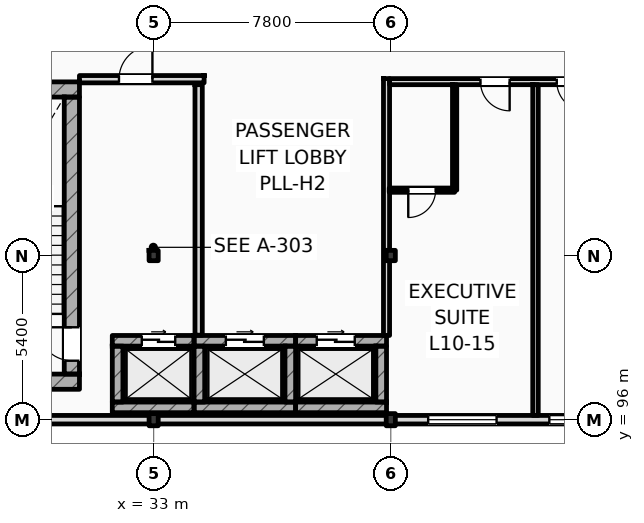
"""IFC4 building model, lengths in metres.
Left out: names, types, materials, properties, quantities, classifications, styles, units other than length and angle.
Written with IfcOpenShell. Run it as: python <this file> out.ifc"""

import sys

from ifc_helpers import new_model, si_unit, direction, frame, frame_2d, origin, origin_2d, place, context, subcontext, project, spatial, rectangle, i_section, extrude, element, fill, save


model = new_model("IFC4")
c1 = context("Model", 3, precision=1e-05, world=origin(), true_north=direction((0.0, 1.0)))
c2 = subcontext(c1, "Body", "Model", "MODEL_VIEW")
j1 = project(units=[si_unit("LENGTHUNIT", "METRE"), si_unit("PLANEANGLEUNIT", "RADIAN")], contexts=[c1])
p1 = place(None, origin())
s1 = spatial("IfcSite", under=j1, at=p1, CompositionType="ELEMENT")
p2 = place(p1, origin())
s2 = spatial("IfcBuilding", under=s1, at=p2, CompositionType="ELEMENT")
p3 = place(p2, frame((0.0, 0.0, 42.6)))
s3 = spatial("IfcBuildingStorey", under=s2, at=p3, CompositionType="ELEMENT", Elevation=42.6)
p4 = place(p3, frame((33.0, 96.0, 0.0), z_axis=(0.0, 0.0, 1.0), x_axis=(1.0, 0.0, 0.0)))
e1 = element("IfcColumn", 1, at=p4, inside=s3, PredefinedType="COLUMN", context=c2, shape_type="SweptSolid", body=[
    extrude(i_section(OverallWidth=0.3, OverallDepth=0.4, WebThickness=0.013, FlangeThickness=0.024, FilletRadius=0.027, at=origin_2d()), origin(), (0.0, 0.0, 1.0), 4.2),
])
p5 = place(p3, frame((33.0, 101.4, 0.0), z_axis=(0.0, 0.0, 1.0), x_axis=(1.0, 0.0, 0.0)))
e2 = element("IfcColumn", 2, at=p5, inside=s3, PredefinedType="COLUMN", context=c2, shape_type="SweptSolid", body=[
    extrude(i_section(OverallWidth=0.3, OverallDepth=0.34, WebThickness=0.012, FlangeThickness=0.021, FilletRadius=0.027, at=origin_2d()), origin(), (0.0, 0.0, 1.0), 4.2),
])
p6 = place(p3, frame((40.8, 96.0, 0.0), z_axis=(0.0, 0.0, 1.0), x_axis=(1.0, 0.0, 0.0)))
e3 = element("IfcColumn", 3, at=p6, inside=s3, PredefinedType="COLUMN", context=c2, shape_type="SweptSolid", body=[
    extrude(i_section(OverallWidth=0.3, OverallDepth=0.4, WebThickness=0.013, FlangeThickness=0.024, FilletRadius=0.027, at=origin_2d()), origin(), (0.0, 0.0, 1.0), 4.2),
])
p7 = place(p3, frame((40.8, 101.4, 0.0), z_axis=(0.0, 0.0, 1.0), x_axis=(1.0, 0.0, 0.0)))
e4 = element("IfcColumn", 4, at=p7, inside=s3, PredefinedType="COLUMN", context=c2, shape_type="SweptSolid", body=[
    extrude(i_section(OverallWidth=0.3, OverallDepth=0.34, WebThickness=0.012, FlangeThickness=0.021, FilletRadius=0.027, at=origin_2d()), origin(), (0.0, 0.0, 1.0), 4.2),
])
for number, where, z_axis, x_axis in (
    (5, (25.4, 106.862, 0.0), (0.0, 0.0, 1.0), (1.0, 0.0, 0.0)),
    (6, (25.4, 97.25, 0.0), (0.0, 0.0, 1.0), (1.0, 0.0, 0.0)),
):
    element("IfcWall", number, at=place(p3, frame(where, z_axis=z_axis, x_axis=x_axis)), inside=s3, PredefinedType="SHEAR", context=c2, shape_type="SweptSolid", body=[
        extrude(rectangle(XDim=5.16, YDim=0.5, at=frame_2d((2.58, 0.0))), origin(), (0.0, 0.0, 1.0), 4.2),
    ])
p8 = place(p3, frame((30.31, 97.5, 0.0), z_axis=(0.0, 0.0, 1.0), x_axis=(0.0, 1.0, 0.0)))
e7 = element("IfcWall", 7, at=p8, inside=s3, PredefinedType="SHEAR", context=c2, shape_type="SweptSolid", body=[
    extrude(rectangle(XDim=9.112, YDim=0.5, at=frame_2d((4.556, 0.0))), origin(), (0.0, 0.0, 1.0), 4.2),
])
p9 = place(p8, frame((0.44, 0.0, 0.0)))
e8 = element("IfcOpeningElement", 8, at=p9, cuts=e7, PredefinedType="OPENING", context=c2, shape_type="SweptSolid", body=[
    extrude(rectangle(XDim=1.1, YDim=2.2, at=frame_2d((0.55, 1.1))), frame((0.0, 0.26, 0.0), z_axis=(0.0, -1.0, 0.0), x_axis=(1.0, 0.0, 0.0)), (0.0, 0.0, 1.0), 0.52),
])
p10 = place(p3, frame((25.2, 96.0, 0.0), z_axis=(0.0, 0.0, 1.0), x_axis=(1.0, 0.0, 0.0)))
e9 = element("IfcWall", 9, at=p10, inside=s3, PredefinedType="STANDARD", context=c2, shape_type="SweptSolid", body=[
    extrude(rectangle(XDim=70.2, YDim=0.28, at=frame_2d((35.1, 0.0))), origin(), (0.0, 0.0, 1.0), 3.42),
])
p11 = place(p10, frame((16.83, 0.0, 0.9)))
e10 = element("IfcOpeningElement", 10, at=p11, cuts=e9, PredefinedType="OPENING", context=c2, shape_type="SweptSolid", body=[
    extrude(rectangle(XDim=2.25, YDim=2.15, at=frame_2d((1.125, 1.075))), frame((0.0, 0.15, 0.0), z_axis=(0.0, -1.0, 0.0), x_axis=(1.0, 0.0, 0.0)), (0.0, 0.0, 1.0), 0.3),
])
p12 = place(p10, frame((20.815, 0.0, 0.9)))
e11 = element("IfcOpeningElement", 11, at=p12, cuts=e9, PredefinedType="OPENING", context=c2, shape_type="SweptSolid", body=[
    extrude(rectangle(XDim=1.8, YDim=2.2, at=frame_2d((0.9, 1.1))), frame((0.0, 0.15, 0.0), z_axis=(0.0, -1.0, 0.0), x_axis=(1.0, 0.0, 0.0)), (0.0, 0.0, 1.0), 0.3),
])
p13 = place(p10, frame((26.03, 0.0, 0.9)))
e12 = element("IfcOpeningElement", 12, at=p13, cuts=e9, PredefinedType="OPENING", context=c2, shape_type="SweptSolid", body=[
    extrude(rectangle(XDim=2.55, YDim=2.25, at=frame_2d((1.275, 1.125))), frame((0.0, 0.15, 0.0), z_axis=(0.0, -1.0, 0.0), x_axis=(1.0, 0.0, 0.0)), (0.0, 0.0, 1.0), 0.3),
])
p14 = place(p10, frame((32.045, 0.0, 0.9)))
e13 = element("IfcOpeningElement", 13, at=p14, cuts=e9, PredefinedType="OPENING", context=c2, shape_type="SweptSolid", body=[
    extrude(rectangle(XDim=1.35, YDim=2.3, at=frame_2d((0.675, 1.15))), frame((0.0, 0.15, 0.0), z_axis=(0.0, -1.0, 0.0), x_axis=(1.0, 0.0, 0.0)), (0.0, 0.0, 1.0), 0.3),
])
p15 = place(p10, frame((35.2, 0.0, 0.9)))
e14 = element("IfcOpeningElement", 14, at=p15, cuts=e9, PredefinedType="OPENING", context=c2, shape_type="SweptSolid", body=[
    extrude(rectangle(XDim=2.85, YDim=2.34, at=frame_2d((1.425, 1.17))), frame((0.0, 0.15, 0.0), z_axis=(0.0, -1.0, 0.0), x_axis=(1.0, 0.0, 0.0)), (0.0, 0.0, 1.0), 0.3),
])
p16 = place(p10, frame((55.544, 0.0, 0.9)))
e15 = element("IfcOpeningElement", 15, at=p16, cuts=e9, PredefinedType="OPENING", context=c2, shape_type="SweptSolid", body=[
    extrude(rectangle(XDim=3.0, YDim=2.34, at=frame_2d((1.5, 1.17))), frame((0.0, 0.15, 0.0), z_axis=(0.0, -1.0, 0.0), x_axis=(1.0, 0.0, 0.0)), (0.0, 0.0, 1.0), 0.3),
])
p17 = place(p10, frame((60.151, 0.0, 0.9)))
e16 = element("IfcOpeningElement", 16, at=p17, cuts=e9, PredefinedType="OPENING", context=c2, shape_type="SweptSolid", body=[
    extrude(rectangle(XDim=1.35, YDim=2.34, at=frame_2d((0.675, 1.17))), frame((0.0, 0.15, 0.0), z_axis=(0.0, -1.0, 0.0), x_axis=(1.0, 0.0, 0.0)), (0.0, 0.0, 1.0), 0.3),
])
p18 = place(p10, frame((65.582, 0.0, 0.9)))
e17 = element("IfcOpeningElement", 17, at=p18, cuts=e9, PredefinedType="OPENING", context=c2, shape_type="SweptSolid", body=[
    extrude(rectangle(XDim=3.4, YDim=2.34, at=frame_2d((1.7, 1.17))), frame((0.0, 0.15, 0.0), z_axis=(0.0, -1.0, 0.0), x_axis=(1.0, 0.0, 0.0)), (0.0, 0.0, 1.0), 0.3),
])
p19 = place(p3, frame((31.64, 98.595, 0.0), z_axis=(0.0, 0.0, 1.0), x_axis=(1.0, 0.0, 0.0)))
e18 = element("IfcWall", 18, at=p19, inside=s3, PredefinedType="SHEAR", context=c2, shape_type="SweptSolid", body=[
    extrude(rectangle(XDim=2.69, YDim=0.35, at=frame_2d((1.345, 0.0))), origin(), (0.0, 0.0, 1.0), 3.94),
])
p20 = place(p19, frame((0.97, 0.0, 0.0)))
e19 = element("IfcOpeningElement", 19, at=p20, cuts=e18, PredefinedType="OPENING", context=c2, shape_type="SweptSolid", body=[
    extrude(rectangle(XDim=1.1, YDim=2.2, at=frame_2d((0.55, 1.1))), frame((0.0, 0.185, 0.0), z_axis=(0.0, -1.0, 0.0), x_axis=(1.0, 0.0, 0.0)), (0.0, 0.0, 1.0), 0.37),
])
p21 = place(p3, frame((31.64, 96.405, 0.0), z_axis=(0.0, 0.0, 1.0), x_axis=(1.0, 0.0, 0.0)))
e20 = element("IfcWall", 20, at=p21, inside=s3, PredefinedType="SHEAR", context=c2, shape_type="SweptSolid", body=[
    extrude(rectangle(XDim=2.69, YDim=0.35, at=frame_2d((1.345, 0.0))), origin(), (0.0, 0.0, 1.0), 3.94),
])
p22 = place(p3, frame((31.815, 96.58, 0.0), z_axis=(0.0, 0.0, 1.0), x_axis=(0.0, 1.0, 0.0)))
e21 = element("IfcWall", 21, at=p22, inside=s3, PredefinedType="SHEAR", context=c2, shape_type="SweptSolid", body=[
    extrude(rectangle(XDim=1.84, YDim=0.35, at=frame_2d((0.92, 0.0))), origin(), (0.0, 0.0, 1.0), 3.94),
])
p23 = place(p3, frame((34.33, 98.595, 0.0), z_axis=(0.0, 0.0, 1.0), x_axis=(1.0, 0.0, 0.0)))
e22 = element("IfcWall", 22, at=p23, inside=s3, PredefinedType="SHEAR", context=c2, shape_type="SweptSolid", body=[
    extrude(rectangle(XDim=3.34, YDim=0.35, at=frame_2d((1.67, 0.0))), origin(), (0.0, 0.0, 1.0), 3.94),
])
p24 = place(p23, frame((1.045, 0.0, 0.0)))
e23 = element("IfcOpeningElement", 23, at=p24, cuts=e22, PredefinedType="OPENING", context=c2, shape_type="SweptSolid", body=[
    extrude(rectangle(XDim=1.25, YDim=2.25, at=frame_2d((0.625, 1.125))), frame((0.0, 0.185, 0.0), z_axis=(0.0, -1.0, 0.0), x_axis=(1.0, 0.0, 0.0)), (0.0, 0.0, 1.0), 0.37),
])
p25 = place(p3, frame((34.33, 96.405, 0.0), z_axis=(0.0, 0.0, 1.0), x_axis=(1.0, 0.0, 0.0)))
e24 = element("IfcWall", 24, at=p25, inside=s3, PredefinedType="SHEAR", context=c2, shape_type="SweptSolid", body=[
    extrude(rectangle(XDim=3.34, YDim=0.35, at=frame_2d((1.67, 0.0))), origin(), (0.0, 0.0, 1.0), 3.94),
])
for number, where, z_axis, x_axis in (
    (25, (34.505, 96.58, 0.0), (0.0, 0.0, 1.0), (0.0, 1.0, 0.0)),
    (26, (37.495, 96.58, 0.0), (0.0, 0.0, 1.0), (0.0, 1.0, 0.0)),
):
    element("IfcWall", number, at=place(p3, frame(where, z_axis=z_axis, x_axis=x_axis)), inside=s3, PredefinedType="SHEAR", context=c2, shape_type="SweptSolid", body=[
        extrude(rectangle(XDim=1.84, YDim=0.35, at=frame_2d((0.92, 0.0))), origin(), (0.0, 0.0, 1.0), 3.94),
    ])
p26 = place(p3, frame((37.67, 98.595, 0.0), z_axis=(0.0, 0.0, 1.0), x_axis=(1.0, 0.0, 0.0)))
e27 = element("IfcWall", 27, at=p26, inside=s3, PredefinedType="SHEAR", context=c2, shape_type="SweptSolid", body=[
    extrude(rectangle(XDim=2.99, YDim=0.35, at=frame_2d((1.495, 0.0))), origin(), (0.0, 0.0, 1.0), 3.94),
])
p27 = place(p26, frame((0.695, 0.0, 0.0)))
e28 = element("IfcOpeningElement", 28, at=p27, cuts=e27, PredefinedType="OPENING", context=c2, shape_type="SweptSolid", body=[
    extrude(rectangle(XDim=1.25, YDim=2.25, at=frame_2d((0.625, 1.125))), frame((0.0, 0.185, 0.0), z_axis=(0.0, -1.0, 0.0), x_axis=(1.0, 0.0, 0.0)), (0.0, 0.0, 1.0), 0.37),
])
p28 = place(p3, frame((37.67, 96.405, 0.0), z_axis=(0.0, 0.0, 1.0), x_axis=(1.0, 0.0, 0.0)))
e29 = element("IfcWall", 29, at=p28, inside=s3, PredefinedType="SHEAR", context=c2, shape_type="SweptSolid", body=[
    extrude(rectangle(XDim=2.99, YDim=0.35, at=frame_2d((1.495, 0.0))), origin(), (0.0, 0.0, 1.0), 3.94),
])
p29 = place(p3, frame((40.485, 96.58, 0.0), z_axis=(0.0, 0.0, 1.0), x_axis=(0.0, 1.0, 0.0)))
e30 = element("IfcWall", 30, at=p29, inside=s3, PredefinedType="SHEAR", context=c2, shape_type="SweptSolid", body=[
    extrude(rectangle(XDim=1.84, YDim=0.35, at=frame_2d((0.92, 0.0))), origin(), (0.0, 0.0, 1.0), 3.57),
])
p30 = place(p3, frame((34.48, 98.78, 0.0), z_axis=(0.0, 0.0, 1.0), x_axis=(0.0, 1.0, 0.0)))
e31 = element("IfcWall", 31, at=p30, inside=s3, PredefinedType="STANDARD", context=c2, shape_type="SweptSolid", body=[
    extrude(rectangle(XDim=8.24, YDim=0.24, at=frame_2d((4.12, 0.0))), origin(), (0.0, 0.0, 1.0), 3.94),
])
p31 = place(p3, frame((30.56, 107.2, 0.0), z_axis=(0.0, 0.0, 1.0), x_axis=(1.0, 0.0, 0.0)))
e32 = element("IfcWall", 32, at=p31, inside=s3, PredefinedType="STANDARD", context=c2, shape_type="SweptSolid", body=[
    extrude(rectangle(XDim=4.1, YDim=0.24, at=frame_2d((2.05, 0.0))), origin(), (0.0, 0.0, 1.0), 3.94),
])
p32 = place(p31, frame((1.3, 0.0, 0.0)))
e33 = element("IfcOpeningElement", 33, at=p32, cuts=e32, PredefinedType="OPENING", context=c2, shape_type="SweptSolid", body=[
    extrude(rectangle(XDim=1.1, YDim=2.2, at=frame_2d((0.55, 1.1))), frame((0.0, 0.13, 0.0), z_axis=(0.0, -1.0, 0.0), x_axis=(1.0, 0.0, 0.0)), (0.0, 0.0, 1.0), 0.26),
])
p33 = place(p3, frame((40.76, 107.12, 0.0), z_axis=(0.0, 0.0, 1.0), x_axis=(1.0, 0.0, 0.0)))
e34 = element("IfcWall", 34, at=p33, inside=s3, PredefinedType="PARTITIONING", context=c2, shape_type="SweptSolid", body=[
    extrude(rectangle(XDim=23.44, YDim=0.2, at=frame_2d((11.72, 0.0))), origin(), (0.0, 0.0, 1.0), 3.94),
])
p34 = place(p33, frame((2.99, 0.0, 0.0)))
e35 = element("IfcOpeningElement", 35, at=p34, cuts=e34, PredefinedType="OPENING", context=c2, shape_type="SweptSolid", body=[
    extrude(rectangle(XDim=0.96, YDim=2.2, at=frame_2d((0.48, 1.1))), frame((0.0, 0.11, 0.0), z_axis=(0.0, -1.0, 0.0), x_axis=(1.0, 0.0, 0.0)), (0.0, 0.0, 1.0), 0.22),
])
p35 = place(p33, frame((5.5, 0.0, 0.0)))
e36 = element("IfcOpeningElement", 36, at=p35, cuts=e34, PredefinedType="OPENING", context=c2, shape_type="SweptSolid", body=[
    extrude(rectangle(XDim=0.96, YDim=2.2, at=frame_2d((0.48, 1.1))), frame((0.0, 0.11, 0.0), z_axis=(0.0, -1.0, 0.0), x_axis=(1.0, 0.0, 0.0)), (0.0, 0.0, 1.0), 0.22),
])
p36 = place(p33, frame((12.34, 0.0, 0.0)))
e37 = element("IfcOpeningElement", 37, at=p36, cuts=e34, PredefinedType="OPENING", context=c2, shape_type="SweptSolid", body=[
    extrude(rectangle(XDim=0.96, YDim=2.2, at=frame_2d((0.48, 1.1))), frame((0.0, 0.11, 0.0), z_axis=(0.0, -1.0, 0.0), x_axis=(1.0, 0.0, 0.0)), (0.0, 0.0, 1.0), 0.22),
])
p37 = place(p33, frame((17.03, 0.0, 0.0)))
e38 = element("IfcOpeningElement", 38, at=p37, cuts=e34, PredefinedType="OPENING", context=c2, shape_type="SweptSolid", body=[
    extrude(rectangle(XDim=0.96, YDim=2.2, at=frame_2d((0.48, 1.1))), frame((0.0, 0.11, 0.0), z_axis=(0.0, -1.0, 0.0), x_axis=(1.0, 0.0, 0.0)), (0.0, 0.0, 1.0), 0.22),
])
p38 = place(p33, frame((19.51, 0.0, 0.0)))
e39 = element("IfcOpeningElement", 39, at=p38, cuts=e34, PredefinedType="OPENING", context=c2, shape_type="SweptSolid", body=[
    extrude(rectangle(XDim=0.96, YDim=2.2, at=frame_2d((0.48, 1.1))), frame((0.0, 0.11, 0.0), z_axis=(0.0, -1.0, 0.0), x_axis=(1.0, 0.0, 0.0)), (0.0, 0.0, 1.0), 0.22),
])
p39 = place(p3, frame((40.66, 98.77, 0.0), z_axis=(0.0, 0.0, 1.0), x_axis=(0.0, 1.0, 0.0)))
e40 = element("IfcWall", 40, at=p39, inside=s3, PredefinedType="PARTITIONING", context=c2, shape_type="SweptSolid", body=[
    extrude(rectangle(XDim=8.45, YDim=0.2, at=frame_2d((4.225, 0.0))), origin(), (0.0, 0.0, 1.0), 3.57),
])
p40 = place(p3, frame((45.56, 96.14, 0.0), z_axis=(0.0, 0.0, 1.0), x_axis=(0.0, 1.0, 0.0)))
e41 = element("IfcWall", 41, at=p40, inside=s3, PredefinedType="PARTITIONING", context=c2, shape_type="SweptSolid", body=[
    extrude(rectangle(XDim=10.88, YDim=0.18, at=frame_2d((5.44, 0.0))), origin(), (0.0, 0.0, 1.0), 3.94),
])
p41 = place(p3, frame((42.9, 103.55, 0.0), z_axis=(0.0, 0.0, 1.0), x_axis=(0.0, 1.0, 0.0)))
e42 = element("IfcWall", 42, at=p41, inside=s3, PredefinedType="PARTITIONING", context=c2, shape_type="SweptSolid", body=[
    extrude(rectangle(XDim=3.47, YDim=0.14, at=frame_2d((1.735, 0.0))), origin(), (0.0, 0.0, 1.0), 3.94),
])
p42 = place(p3, frame((40.75, 103.55, 0.0), z_axis=(0.0, 0.0, 1.0), x_axis=(1.0, 0.0, 0.0)))
e43 = element("IfcWall", 43, at=p42, inside=s3, PredefinedType="PARTITIONING", context=c2, shape_type="SweptSolid", body=[
    extrude(rectangle(XDim=2.15, YDim=0.14, at=frame_2d((1.075, 0.0))), origin(), (0.0, 0.0, 1.0), 3.94),
])
p43 = place(p42, frame((0.625, 0.0, 0.0)))
e44 = element("IfcOpeningElement", 44, at=p43, cuts=e43, PredefinedType="OPENING", context=c2, shape_type="SweptSolid", body=[
    extrude(rectangle(XDim=0.9, YDim=2.1, at=frame_2d((0.45, 1.05))), frame((0.0, 0.08, 0.0), z_axis=(0.0, -1.0, 0.0), x_axis=(1.0, 0.0, 0.0)), (0.0, 0.0, 1.0), 0.16),
])
p44 = place(p11, origin())
e45 = element("IfcWindow", 45, at=p44, inside=s3, PartitioningType="DOUBLE_PANEL_VERTICAL", PredefinedType="WINDOW", context=c2, shape_type="SweptSolid", body=[
    extrude(rectangle(XDim=2.25, YDim=2.15, at=frame_2d((1.125, 1.075))), frame((0.0, 0.03, 0.0), z_axis=(0.0, -1.0, 0.0), x_axis=(1.0, 0.0, 0.0)), (0.0, 0.0, 1.0), 0.06),
])
fill(e10, e45)
p45 = place(p12, origin())
e46 = element("IfcWindow", 46, at=p45, inside=s3, PartitioningType="DOUBLE_PANEL_VERTICAL", PredefinedType="WINDOW", context=c2, shape_type="SweptSolid", body=[
    extrude(rectangle(XDim=1.8, YDim=2.2, at=frame_2d((0.9, 1.1))), frame((0.0, 0.03, 0.0), z_axis=(0.0, -1.0, 0.0), x_axis=(1.0, 0.0, 0.0)), (0.0, 0.0, 1.0), 0.06),
])
fill(e11, e46)
p46 = place(p9, origin())
e47 = element("IfcDoor", 47, at=p46, inside=s3, OperationType="SINGLE_SWING_RIGHT", PredefinedType="DOOR", context=c2, shape_type="SweptSolid", body=[
    extrude(rectangle(XDim=1.1, YDim=2.2, at=frame_2d((0.55, 1.1))), frame((0.0, 0.025, 0.0), z_axis=(0.0, -1.0, 0.0), x_axis=(1.0, 0.0, 0.0)), (0.0, 0.0, 1.0), 0.05),
])
fill(e8, e47)
p47 = place(p20, origin())
e48 = element("IfcDoor", 48, at=p47, inside=s3, OperationType="SLIDING_TO_LEFT", PredefinedType="DOOR", context=c2, shape_type="SweptSolid", body=[
    extrude(rectangle(XDim=1.1, YDim=2.2, at=frame_2d((0.55, 1.1))), frame((0.0, 0.025, 0.0), z_axis=(0.0, -1.0, 0.0), x_axis=(1.0, 0.0, 0.0)), (0.0, 0.0, 1.0), 0.05),
])
fill(e19, e48)
p48 = place(p24, origin())
e49 = element("IfcDoor", 49, at=p48, inside=s3, OperationType="SLIDING_TO_LEFT", PredefinedType="DOOR", context=c2, shape_type="SweptSolid", body=[
    extrude(rectangle(XDim=1.25, YDim=2.25, at=frame_2d((0.625, 1.125))), frame((0.0, 0.025, 0.0), z_axis=(0.0, -1.0, 0.0), x_axis=(1.0, 0.0, 0.0)), (0.0, 0.0, 1.0), 0.05),
])
fill(e23, e49)
p49 = place(p27, origin())
e50 = element("IfcDoor", 50, at=p49, inside=s3, OperationType="SLIDING_TO_LEFT", PredefinedType="DOOR", context=c2, shape_type="SweptSolid", body=[
    extrude(rectangle(XDim=1.25, YDim=2.25, at=frame_2d((0.625, 1.125))), frame((0.0, 0.025, 0.0), z_axis=(0.0, -1.0, 0.0), x_axis=(1.0, 0.0, 0.0)), (0.0, 0.0, 1.0), 0.05),
])
fill(e28, e50)
p50 = place(p32, origin())
e51 = element("IfcDoor", 51, at=p50, inside=s3, OperationType="SINGLE_SWING_RIGHT", PredefinedType="DOOR", context=c2, shape_type="SweptSolid", body=[
    extrude(rectangle(XDim=1.1, YDim=2.2, at=frame_2d((0.55, 1.1))), frame((0.0, 0.025, 0.0), z_axis=(0.0, -1.0, 0.0), x_axis=(1.0, 0.0, 0.0)), (0.0, 0.0, 1.0), 0.05),
])
fill(e33, e51)
p51 = place(p34, frame((0.96, 0.0, 0.0), z_axis=(0.0, 0.0, 1.0), x_axis=(-1.0, 0.0, 0.0)))
e52 = element("IfcDoor", 52, at=p51, inside=s3, OperationType="SINGLE_SWING_RIGHT", PredefinedType="DOOR", context=c2, shape_type="SweptSolid", body=[
    extrude(rectangle(XDim=0.96, YDim=2.2, at=frame_2d((0.48, 1.1))), frame((0.0, 0.025, 0.0), z_axis=(0.0, -1.0, 0.0), x_axis=(1.0, 0.0, 0.0)), (0.0, 0.0, 1.0), 0.05),
])
fill(e35, e52)
p52 = place(p43, frame((0.9, 0.0, 0.0), z_axis=(0.0, 0.0, 1.0), x_axis=(-1.0, 0.0, 0.0)))
e53 = element("IfcDoor", 53, at=p52, inside=s3, OperationType="SINGLE_SWING_LEFT", PredefinedType="DOOR", context=c2, shape_type="SweptSolid", body=[
    extrude(rectangle(XDim=0.9, YDim=2.1, at=frame_2d((0.45, 1.05))), frame((0.0, 0.025, 0.0), z_axis=(0.0, -1.0, 0.0), x_axis=(1.0, 0.0, 0.0)), (0.0, 0.0, 1.0), 0.05),
])
fill(e44, e53)
p53 = place(p35, frame((0.96, 0.0, 0.0), z_axis=(0.0, 0.0, 1.0), x_axis=(-1.0, 0.0, 0.0)))
e54 = element("IfcDoor", 54, at=p53, inside=s3, OperationType="SINGLE_SWING_RIGHT", PredefinedType="DOOR", context=c2, shape_type="SweptSolid", body=[
    extrude(rectangle(XDim=0.96, YDim=2.2, at=frame_2d((0.48, 1.1))), frame((0.0, 0.025, 0.0), z_axis=(0.0, -1.0, 0.0), x_axis=(1.0, 0.0, 0.0)), (0.0, 0.0, 1.0), 0.05),
])
fill(e36, e54)
save(model, sys.argv[1])
